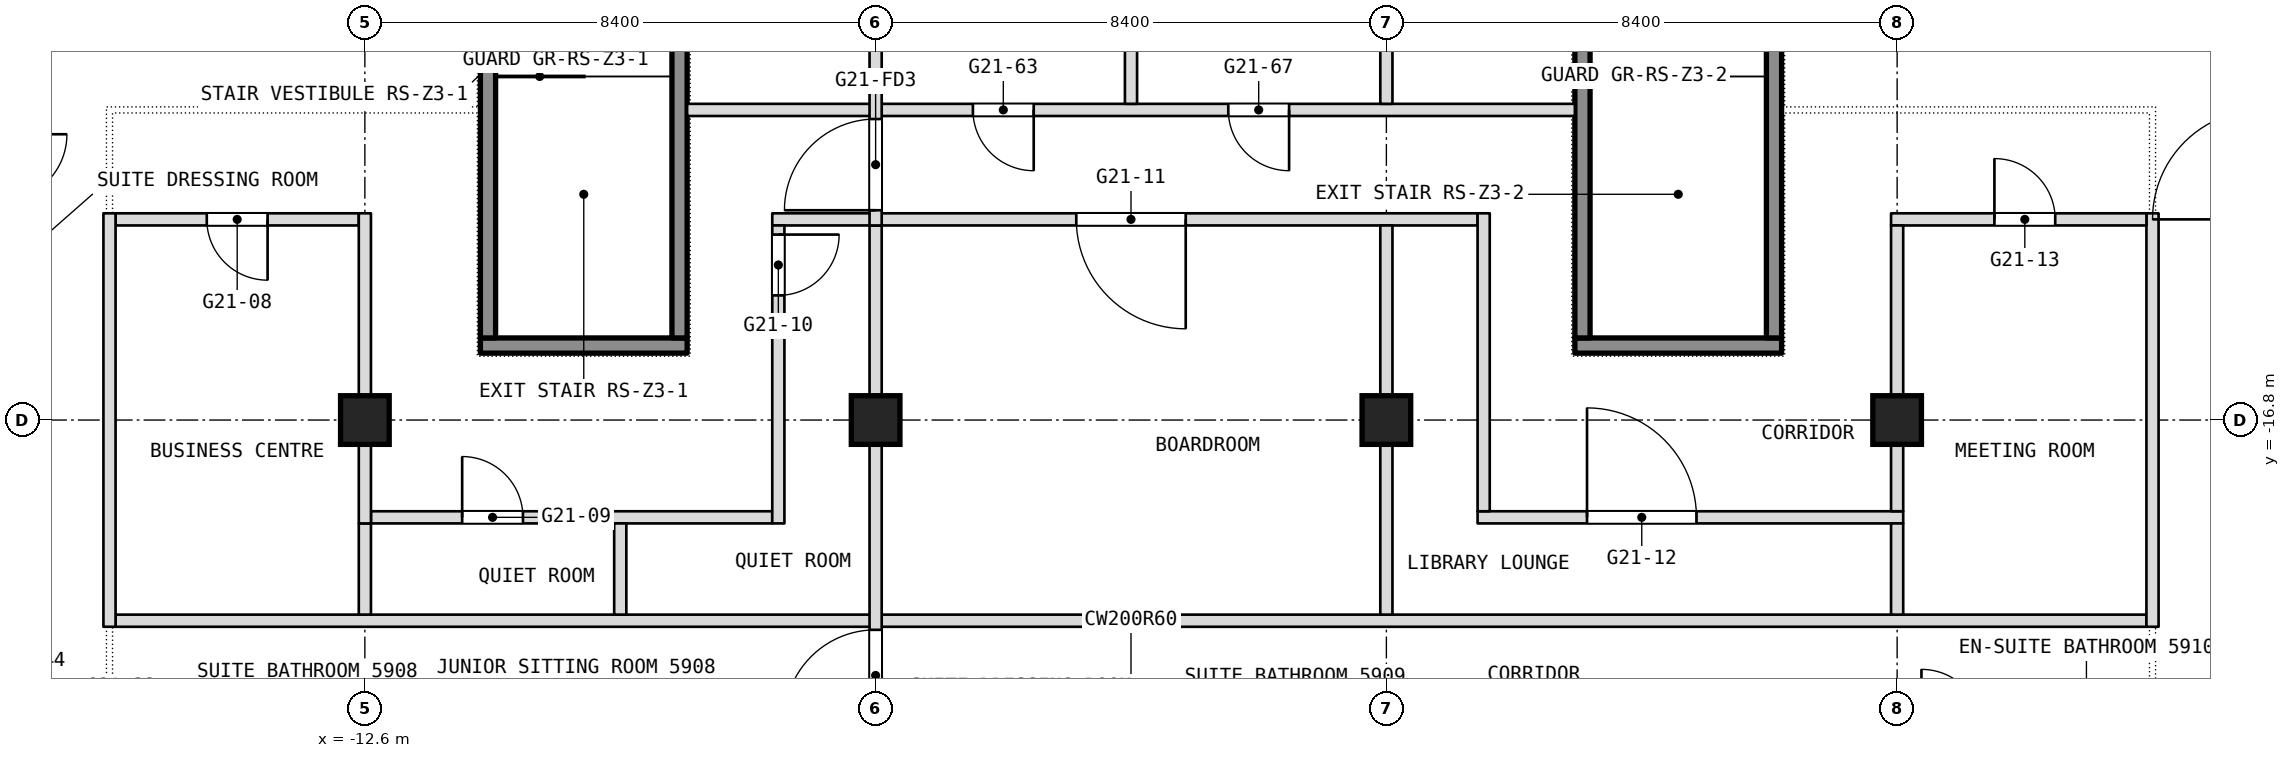
"""IFC4 building model, lengths in metres.
Left out: names, types, materials, properties, quantities, classifications, styles, units other than length and angle.
Written with IfcOpenShell. Run it as: python <this file> out.ifc"""

import sys

from ifc_helpers import new_model, si_unit, direction, frame, frame_2d, origin, origin_2d, place, context, subcontext, project, spatial, rectangle, extrude, element, fill, save


model = new_model("IFC4")
c1 = context("Model", 3, precision=1e-05, world=origin(), true_north=direction((0.0, 1.0)))
c2 = subcontext(c1, "Body", "Model", "MODEL_VIEW")
j1 = project(units=[si_unit("LENGTHUNIT", "METRE"), si_unit("PLANEANGLEUNIT", "RADIAN")], contexts=[c1])
p1 = place(None, origin())
s1 = spatial("IfcSite", under=j1, at=p1, CompositionType="ELEMENT")
p2 = place(p1, origin())
s2 = spatial("IfcBuilding", under=s1, at=p2, CompositionType="ELEMENT")
p3 = place(p2, frame((0.0, 0.0, 248.9)))
s3 = spatial("IfcBuildingStorey", under=s2, at=p3, CompositionType="ELEMENT", Elevation=248.9)
for number, where, z_axis, x_axis in (
    (1, (-12.6, -16.8, 0.0), (0.0, 0.0, 1.0), (1.0, 0.0, 0.0)),
    (2, (-4.2, -16.8, 0.0), (0.0, 0.0, 1.0), (1.0, 0.0, 0.0)),
    (3, (4.2, -16.8, 0.0), (0.0, 0.0, 1.0), (1.0, 0.0, 0.0)),
    (4, (12.6, -16.8, 0.0), (0.0, 0.0, 1.0), (1.0, 0.0, 0.0)),
):
    element("IfcColumn", number, at=place(p3, frame(where, z_axis=z_axis, x_axis=x_axis)), inside=s3, PredefinedType="COLUMN", context=c2, shape_type="SweptSolid", body=[
        extrude(rectangle(XDim=0.8, YDim=0.8, at=origin_2d()), origin(), (0.0, 0.0, 1.0), 3.6),
    ])
p4 = place(p3, frame((-16.7, -20.1, 0.0), z_axis=(0.0, 0.0, 1.0), x_axis=(1.0, 0.0, 0.0)))
e5 = element("IfcWall", 5, at=p4, inside=s3, PredefinedType="PARTITIONING", context=c2, shape_type="SweptSolid", body=[
    extrude(rectangle(XDim=33.4, YDim=0.2, at=frame_2d((16.7, 0.0))), origin(), (0.0, 0.0, 1.0), 3.3),
])
p5 = place(p3, frame((-12.5, -18.4, 0.0), z_axis=(0.0, 0.0, 1.0), x_axis=(1.0, 0.0, 0.0)))
e6 = element("IfcWall", 6, at=p5, inside=s3, PredefinedType="PARTITIONING", context=c2, shape_type="SweptSolid", body=[
    extrude(rectangle(XDim=6.6, YDim=0.2, at=frame_2d((3.3, 0.0))), origin(), (0.0, 0.0, 1.0), 3.3),
])
p6 = place(p5, frame((1.5, 0.0, 0.0)))
e7 = element("IfcOpeningElement", 7, at=p6, cuts=e6, PredefinedType="OPENING", context=c2, shape_type="SweptSolid", body=[
    extrude(rectangle(XDim=1.0, YDim=2.1, at=frame_2d((0.5, 1.05))), frame((0.0, 0.1, 0.0), z_axis=(0.0, -1.0, 0.0), x_axis=(1.0, 0.0, 0.0)), (0.0, 0.0, 1.0), 0.2),
])
p7 = place(p3, frame((5.7, -18.4, 0.0), z_axis=(0.0, 0.0, 1.0), x_axis=(1.0, 0.0, 0.0)))
e8 = element("IfcWall", 8, at=p7, inside=s3, PredefinedType="PARTITIONING", context=c2, shape_type="SweptSolid", body=[
    extrude(rectangle(XDim=7.0, YDim=0.2, at=frame_2d((3.5, 0.0))), origin(), (0.0, 0.0, 1.0), 3.3),
])
p8 = place(p7, frame((1.8, 0.0, 0.0)))
e9 = element("IfcOpeningElement", 9, at=p8, cuts=e8, PredefinedType="OPENING", context=c2, shape_type="SweptSolid", body=[
    extrude(rectangle(XDim=1.8, YDim=2.1, at=frame_2d((0.9, 1.05))), frame((0.0, 0.1, 0.0), z_axis=(0.0, -1.0, 0.0), x_axis=(1.0, 0.0, 0.0)), (0.0, 0.0, 1.0), 0.2),
])
p9 = place(p3, frame((16.8, -20.2, 0.0), z_axis=(0.0, 0.0, 1.0), x_axis=(0.0, 1.0, 0.0)))
e10 = element("IfcWall", 10, at=p9, inside=s3, PredefinedType="PARTITIONING", context=c2, shape_type="SweptSolid", body=[
    extrude(rectangle(XDim=6.8, YDim=0.2, at=frame_2d((3.4, 0.0))), origin(), (0.0, 0.0, 1.0), 3.3),
])
p10 = place(p3, frame((-16.7, -13.5, 0.0), z_axis=(0.0, 0.0, 1.0), x_axis=(1.0, 0.0, 0.0)))
e11 = element("IfcWall", 11, at=p10, inside=s3, PredefinedType="PARTITIONING", context=c2, shape_type="SweptSolid", body=[
    extrude(rectangle(XDim=4.0, YDim=0.2, at=frame_2d((2.0, 0.0))), origin(), (0.0, 0.0, 1.0), 3.3),
])
p11 = place(p10, frame((1.5, 0.0, 0.0)))
e12 = element("IfcOpeningElement", 12, at=p11, cuts=e11, PredefinedType="OPENING", context=c2, shape_type="SweptSolid", body=[
    extrude(rectangle(XDim=1.0, YDim=2.1, at=frame_2d((0.5, 1.05))), frame((0.0, 0.1, 0.0), z_axis=(0.0, -1.0, 0.0), x_axis=(1.0, 0.0, 0.0)), (0.0, 0.0, 1.0), 0.2),
])
p12 = place(p3, frame((-5.9, -13.5, 0.0), z_axis=(0.0, 0.0, 1.0), x_axis=(1.0, 0.0, 0.0)))
e13 = element("IfcWall", 13, at=p12, inside=s3, PredefinedType="PARTITIONING", context=c2, shape_type="SweptSolid", body=[
    extrude(rectangle(XDim=11.6, YDim=0.2, at=frame_2d((5.8, 0.0))), origin(), (0.0, 0.0, 1.0), 3.3),
])
p13 = place(p12, frame((5.0, 0.0, 0.0)))
e14 = element("IfcOpeningElement", 14, at=p13, cuts=e13, PredefinedType="OPENING", context=c2, shape_type="SweptSolid", body=[
    extrude(rectangle(XDim=1.8, YDim=2.1, at=frame_2d((0.9, 1.05))), frame((0.0, 0.1, 0.0), z_axis=(0.0, -1.0, 0.0), x_axis=(1.0, 0.0, 0.0)), (0.0, 0.0, 1.0), 0.2),
])
p14 = place(p3, frame((12.5, -13.5, 0.0), z_axis=(0.0, 0.0, 1.0), x_axis=(1.0, 0.0, 0.0)))
e15 = element("IfcWall", 15, at=p14, inside=s3, PredefinedType="PARTITIONING", context=c2, shape_type="SweptSolid", body=[
    extrude(rectangle(XDim=4.2, YDim=0.2, at=frame_2d((2.1, 0.0))), origin(), (0.0, 0.0, 1.0), 3.3),
])
p15 = place(p14, frame((1.7, 0.0, 0.0)))
e16 = element("IfcOpeningElement", 16, at=p15, cuts=e15, PredefinedType="OPENING", context=c2, shape_type="SweptSolid", body=[
    extrude(rectangle(XDim=1.0, YDim=2.1, at=frame_2d((0.5, 1.05))), frame((0.0, 0.1, 0.0), z_axis=(0.0, -1.0, 0.0), x_axis=(1.0, 0.0, 0.0)), (0.0, 0.0, 1.0), 0.2),
])
p16 = place(p3, frame((12.6, -20.0, 0.0), z_axis=(0.0, 0.0, 1.0), x_axis=(0.0, 1.0, 0.0)))
e17 = element("IfcWall", 17, at=p16, inside=s3, PredefinedType="PARTITIONING", context=c2, shape_type="SweptSolid", body=[
    extrude(rectangle(XDim=1.5, YDim=0.2, at=frame_2d((0.75, 0.0))), origin(), (0.0, 0.0, 1.0), 2.486),
])
p17 = place(p3, frame((12.6, -18.3, 0.0), z_axis=(0.0, 0.0, 1.0), x_axis=(0.0, 1.0, 0.0)))
e18 = element("IfcWall", 18, at=p17, inside=s3, PredefinedType="PARTITIONING", context=c2, shape_type="SweptSolid", body=[
    extrude(rectangle(XDim=4.7, YDim=0.2, at=frame_2d((2.35, 0.0))), origin(), (0.0, 0.0, 1.0), 2.486),
])
p18 = place(p3, frame((-7.3, -11.7, 0.0), z_axis=(0.0, 0.0, 1.0), x_axis=(1.0, 0.0, 0.0)))
e19 = element("IfcWall", 19, at=p18, inside=s3, PredefinedType="PARTITIONING", context=c2, shape_type="SweptSolid", body=[
    extrude(rectangle(XDim=14.6, YDim=0.2, at=frame_2d((7.3, 0.0))), origin(), (0.0, 0.0, 1.0), 3.3),
])
p19 = place(p18, frame((4.7, 0.0, 0.0)))
e20 = element("IfcOpeningElement", 20, at=p19, cuts=e19, PredefinedType="OPENING", context=c2, shape_type="SweptSolid", body=[
    extrude(rectangle(XDim=1.0, YDim=2.1, at=frame_2d((0.5, 1.05))), frame((0.0, 0.1, 0.0), z_axis=(0.0, -1.0, 0.0), x_axis=(1.0, 0.0, 0.0)), (0.0, 0.0, 1.0), 0.2),
])
p20 = place(p18, frame((8.9, 0.0, 0.0)))
e21 = element("IfcOpeningElement", 21, at=p20, cuts=e19, PredefinedType="OPENING", context=c2, shape_type="SweptSolid", body=[
    extrude(rectangle(XDim=1.0, YDim=2.1, at=frame_2d((0.5, 1.05))), frame((0.0, 0.1, 0.0), z_axis=(0.0, -1.0, 0.0), x_axis=(1.0, 0.0, 0.0)), (0.0, 0.0, 1.0), 0.2),
])
p21 = place(p3, frame((5.8, -18.3, 0.0), z_axis=(0.0, 0.0, 1.0), x_axis=(0.0, 1.0, 0.0)))
e22 = element("IfcWall", 22, at=p21, inside=s3, PredefinedType="PARTITIONING", context=c2, shape_type="SweptSolid", body=[
    extrude(rectangle(XDim=4.9, YDim=0.2, at=frame_2d((2.45, 0.0))), origin(), (0.0, 0.0, 1.0), 3.3),
])
p22 = place(p3, frame((4.2, -20.0, 0.0), z_axis=(0.0, 0.0, 1.0), x_axis=(0.0, 1.0, 0.0)))
e23 = element("IfcWall", 23, at=p22, inside=s3, PredefinedType="PARTITIONING", context=c2, shape_type="SweptSolid", body=[
    extrude(rectangle(XDim=6.4, YDim=0.2, at=frame_2d((3.2, 0.0))), origin(), (0.0, 0.0, 1.0), 2.486),
])
p23 = place(p3, frame((4.2, -11.6, 0.0), z_axis=(0.0, 0.0, 1.0), x_axis=(0.0, 1.0, 0.0)))
e24 = element("IfcWall", 24, at=p23, inside=s3, PredefinedType="PARTITIONING", context=c2, shape_type="SweptSolid", body=[
    extrude(rectangle(XDim=9.7, YDim=0.2, at=frame_2d((4.85, 0.0))), origin(), (0.0, 0.0, 1.0), 2.486),
])
p24 = place(p3, frame((0.0, -11.6, 0.0), z_axis=(0.0, 0.0, 1.0), x_axis=(0.0, 1.0, 0.0)))
e25 = element("IfcWall", 25, at=p24, inside=s3, PredefinedType="PARTITIONING", context=c2, shape_type="SweptSolid", body=[
    extrude(rectangle(XDim=9.7, YDim=0.2, at=frame_2d((4.85, 0.0))), origin(), (0.0, 0.0, 1.0), 3.3),
])
p25 = place(p3, frame((-4.2, -22.0, 0.0), z_axis=(0.0, 0.0, 1.0), x_axis=(0.0, 1.0, 0.0)))
e26 = element("IfcWall", 26, at=p25, inside=s3, PredefinedType="PARTITIONING", context=c2, shape_type="SweptSolid", body=[
    extrude(rectangle(XDim=8.4, YDim=0.2, at=frame_2d((4.2, 0.0))), origin(), (0.0, 0.0, 1.0), 2.486),
])
p26 = place(p25, frame((0.25, 0.0, 0.0)))
e27 = element("IfcOpeningElement", 27, at=p26, cuts=e26, PredefinedType="OPENING", context=c2, shape_type="SweptSolid", body=[
    extrude(rectangle(XDim=1.5, YDim=2.1, at=frame_2d((0.75, 1.05))), frame((0.0, 0.1, 0.0), z_axis=(0.0, -1.0, 0.0), x_axis=(1.0, 0.0, 0.0)), (0.0, 0.0, 1.0), 0.2),
])
p27 = place(p3, frame((-4.2, -13.6, 0.0), z_axis=(0.0, 0.0, 1.0), x_axis=(0.0, 1.0, 0.0)))
e28 = element("IfcWall", 28, at=p27, inside=s3, PredefinedType="PARTITIONING", context=c2, shape_type="SweptSolid", body=[
    extrude(rectangle(XDim=13.6, YDim=0.2, at=frame_2d((6.8, 0.0))), origin(), (0.0, 0.0, 1.0), 2.486),
])
p28 = place(p27, frame((11.95, 0.0, 0.0)))
e29 = element("IfcOpeningElement", 29, at=p28, cuts=e28, PredefinedType="OPENING", context=c2, shape_type="SweptSolid", body=[
    extrude(rectangle(XDim=1.5, YDim=2.1, at=frame_2d((0.75, 1.05))), frame((0.0, 0.1, 0.0), z_axis=(0.0, -1.0, 0.0), x_axis=(1.0, 0.0, 0.0)), (0.0, 0.0, 1.0), 0.2),
])
p29 = place(p27, frame((0.25, 0.0, 0.0)))
e30 = element("IfcOpeningElement", 30, at=p29, cuts=e28, PredefinedType="OPENING", context=c2, shape_type="SweptSolid", body=[
    extrude(rectangle(XDim=1.5, YDim=2.1, at=frame_2d((0.75, 1.05))), frame((0.0, 0.1, 0.0), z_axis=(0.0, -1.0, 0.0), x_axis=(1.0, 0.0, 0.0)), (0.0, 0.0, 1.0), 0.2),
])
p30 = place(p3, frame((-5.8, -18.5, 0.0), z_axis=(0.0, 0.0, 1.0), x_axis=(0.0, 1.0, 0.0)))
e31 = element("IfcWall", 31, at=p30, inside=s3, PredefinedType="PARTITIONING", context=c2, shape_type="SweptSolid", body=[
    extrude(rectangle(XDim=4.9, YDim=0.2, at=frame_2d((2.45, 0.0))), origin(), (0.0, 0.0, 1.0), 3.3),
])
p31 = place(p30, frame((3.75, 0.0, 0.0)))
e32 = element("IfcOpeningElement", 32, at=p31, cuts=e31, PredefinedType="OPENING", context=c2, shape_type="SweptSolid", body=[
    extrude(rectangle(XDim=1.0, YDim=2.1, at=frame_2d((0.5, 1.05))), frame((0.0, 0.1, 0.0), z_axis=(0.0, -1.0, 0.0), x_axis=(1.0, 0.0, 0.0)), (0.0, 0.0, 1.0), 0.2),
])
p32 = place(p3, frame((-8.4, -20.0, 0.0), z_axis=(0.0, 0.0, 1.0), x_axis=(0.0, 1.0, 0.0)))
e33 = element("IfcWall", 33, at=p32, inside=s3, PredefinedType="PARTITIONING", context=c2, shape_type="SweptSolid", body=[
    extrude(rectangle(XDim=1.5, YDim=0.2, at=frame_2d((0.75, 0.0))), origin(), (0.0, 0.0, 1.0), 3.3),
])
p33 = place(p3, frame((-12.6, -20.0, 0.0), z_axis=(0.0, 0.0, 1.0), x_axis=(0.0, 1.0, 0.0)))
e34 = element("IfcWall", 34, at=p33, inside=s3, PredefinedType="PARTITIONING", context=c2, shape_type="SweptSolid", body=[
    extrude(rectangle(XDim=1.5, YDim=0.2, at=frame_2d((0.75, 0.0))), origin(), (0.0, 0.0, 1.0), 2.486),
])
p34 = place(p3, frame((-12.6, -18.5, 0.0), z_axis=(0.0, 0.0, 1.0), x_axis=(0.0, 1.0, 0.0)))
e35 = element("IfcWall", 35, at=p34, inside=s3, PredefinedType="PARTITIONING", context=c2, shape_type="SweptSolid", body=[
    extrude(rectangle(XDim=5.1, YDim=0.2, at=frame_2d((2.55, 0.0))), origin(), (0.0, 0.0, 1.0), 2.486),
])
p35 = place(p3, frame((-16.8, -20.2, 0.0), z_axis=(0.0, 0.0, 1.0), x_axis=(0.0, 1.0, 0.0)))
e36 = element("IfcWall", 36, at=p35, inside=s3, PredefinedType="PARTITIONING", context=c2, shape_type="SweptSolid", body=[
    extrude(rectangle(XDim=6.8, YDim=0.2, at=frame_2d((3.4, 0.0))), origin(), (0.0, 0.0, 1.0), 3.3),
])
p36 = place(p3, frame((-10.7, -15.575, 0.1), z_axis=(0.0, 0.0, 1.0), x_axis=(1.0, 0.0, 0.0)))
e37 = element("IfcWall", 37, at=p36, inside=s3, PredefinedType="SHEAR", context=c2, shape_type="SweptSolid", body=[
    extrude(rectangle(XDim=3.4, YDim=0.25, at=frame_2d((1.7, 0.0))), origin(), (0.0, 0.0, 1.0), 3.2),
])
for number, where, z_axis, x_axis in (
    (38, (-10.575, -15.45, 0.1), (0.0, 0.0, 1.0), (0.0, 1.0, 0.0)),
    (39, (-7.425, -15.45, 0.1), (0.0, 0.0, 1.0), (0.0, 1.0, 0.0)),
):
    element("IfcWall", number, at=place(p3, frame(where, z_axis=z_axis, x_axis=x_axis)), inside=s3, PredefinedType="SHEAR", context=c2, shape_type="SweptSolid", body=[
        extrude(rectangle(XDim=5.7, YDim=0.25, at=frame_2d((2.85, 0.0))), origin(), (0.0, 0.0, 1.0), 3.2),
    ])
p37 = place(p3, frame((7.3, -15.575, 0.1), z_axis=(0.0, 0.0, 1.0), x_axis=(1.0, 0.0, 0.0)))
e40 = element("IfcWall", 40, at=p37, inside=s3, PredefinedType="SHEAR", context=c2, shape_type="SweptSolid", body=[
    extrude(rectangle(XDim=3.4, YDim=0.25, at=frame_2d((1.7, 0.0))), origin(), (0.0, 0.0, 1.0), 3.2),
])
for number, where, z_axis, x_axis in (
    (41, (7.425, -15.45, 0.1), (0.0, 0.0, 1.0), (0.0, 1.0, 0.0)),
    (42, (10.575, -15.45, 0.1), (0.0, 0.0, 1.0), (0.0, 1.0, 0.0)),
):
    element("IfcWall", number, at=place(p3, frame(where, z_axis=z_axis, x_axis=x_axis)), inside=s3, PredefinedType="SHEAR", context=c2, shape_type="SweptSolid", body=[
        extrude(rectangle(XDim=5.7, YDim=0.25, at=frame_2d((2.85, 0.0))), origin(), (0.0, 0.0, 1.0), 3.2),
    ])
p38 = place(p6, origin())
e43 = element("IfcDoor", 43, at=p38, inside=s3, OperationType="SINGLE_SWING_RIGHT", PredefinedType="DOOR", context=c2, shape_type="SweptSolid", body=[
    extrude(rectangle(XDim=1.0, YDim=2.1, at=frame_2d((0.5, 1.05))), frame((0.0, 0.025, 0.0), z_axis=(0.0, -1.0, 0.0), x_axis=(1.0, 0.0, 0.0)), (0.0, 0.0, 1.0), 0.05),
])
fill(e7, e43)
p39 = place(p8, origin())
e44 = element("IfcDoor", 44, at=p39, inside=s3, OperationType="DOUBLE_DOOR_SINGLE_SWING", PredefinedType="DOOR", context=c2, shape_type="SweptSolid", body=[
    extrude(rectangle(XDim=1.8, YDim=2.1, at=frame_2d((0.9, 1.05))), frame((0.0, 0.025, 0.0), z_axis=(0.0, -1.0, 0.0), x_axis=(1.0, 0.0, 0.0)), (0.0, 0.0, 1.0), 0.05),
])
fill(e9, e44)
p40 = place(p11, origin())
e45 = element("IfcDoor", 45, at=p40, inside=s3, OperationType="SINGLE_SWING_RIGHT", PredefinedType="DOOR", context=c2, shape_type="SweptSolid", body=[
    extrude(rectangle(XDim=1.0, YDim=2.1, at=frame_2d((0.5, 1.05))), frame((0.0, 0.025, 0.0), z_axis=(0.0, -1.0, 0.0), x_axis=(1.0, 0.0, 0.0)), (0.0, 0.0, 1.0), 0.05),
])
fill(e12, e45)
p41 = place(p13, origin())
e46 = element("IfcDoor", 46, at=p41, inside=s3, OperationType="DOUBLE_DOOR_SINGLE_SWING", PredefinedType="DOOR", context=c2, shape_type="SweptSolid", body=[
    extrude(rectangle(XDim=1.8, YDim=2.1, at=frame_2d((0.9, 1.05))), frame((0.0, 0.025, 0.0), z_axis=(0.0, -1.0, 0.0), x_axis=(1.0, 0.0, 0.0)), (0.0, 0.0, 1.0), 0.05),
])
fill(e14, e46)
p42 = place(p15, origin())
e47 = element("IfcDoor", 47, at=p42, inside=s3, OperationType="SINGLE_SWING_LEFT", PredefinedType="DOOR", context=c2, shape_type="SweptSolid", body=[
    extrude(rectangle(XDim=1.0, YDim=2.1, at=frame_2d((0.5, 1.05))), frame((0.0, 0.025, 0.0), z_axis=(0.0, -1.0, 0.0), x_axis=(1.0, 0.0, 0.0)), (0.0, 0.0, 1.0), 0.05),
])
fill(e16, e47)
p43 = place(p19, origin())
e48 = element("IfcDoor", 48, at=p43, inside=s3, OperationType="SINGLE_SWING_LEFT", PredefinedType="DOOR", context=c2, shape_type="SweptSolid", body=[
    extrude(rectangle(XDim=1.0, YDim=2.1, at=frame_2d((0.5, 1.05))), frame((0.0, 0.025, 0.0), z_axis=(0.0, -1.0, 0.0), x_axis=(1.0, 0.0, 0.0)), (0.0, 0.0, 1.0), 0.05),
])
fill(e20, e48)
p44 = place(p20, origin())
e49 = element("IfcDoor", 49, at=p44, inside=s3, OperationType="SINGLE_SWING_LEFT", PredefinedType="DOOR", context=c2, shape_type="SweptSolid", body=[
    extrude(rectangle(XDim=1.0, YDim=2.1, at=frame_2d((0.5, 1.05))), frame((0.0, 0.025, 0.0), z_axis=(0.0, -1.0, 0.0), x_axis=(1.0, 0.0, 0.0)), (0.0, 0.0, 1.0), 0.05),
])
fill(e21, e49)
p45 = place(p31, origin())
e50 = element("IfcDoor", 50, at=p45, inside=s3, OperationType="SINGLE_SWING_RIGHT", PredefinedType="DOOR", context=c2, shape_type="SweptSolid", body=[
    extrude(rectangle(XDim=1.0, YDim=2.1, at=frame_2d((0.5, 1.05))), frame((0.0, 0.025, 0.0), z_axis=(0.0, -1.0, 0.0), x_axis=(1.0, 0.0, 0.0)), (0.0, 0.0, 1.0), 0.05),
])
fill(e32, e50)
p46 = place(p29, origin())
e51 = element("IfcDoor", 51, at=p46, inside=s3, OperationType="DOUBLE_DOOR_DOUBLE_SWING", PredefinedType="DOOR", context=c2, shape_type="SweptSolid", body=[
    extrude(rectangle(XDim=1.5, YDim=2.1, at=frame_2d((0.75, 1.05))), frame((0.0, 0.025, 0.0), z_axis=(0.0, -1.0, 0.0), x_axis=(1.0, 0.0, 0.0)), (0.0, 0.0, 1.0), 0.05),
])
fill(e30, e51)
p47 = place(p26, origin())
e52 = element("IfcDoor", 52, at=p47, inside=s3, OperationType="DOUBLE_DOOR_DOUBLE_SWING", PredefinedType="DOOR", context=c2, shape_type="SweptSolid", body=[
    extrude(rectangle(XDim=1.5, YDim=2.1, at=frame_2d((0.75, 1.05))), frame((0.0, 0.025, 0.0), z_axis=(0.0, -1.0, 0.0), x_axis=(1.0, 0.0, 0.0)), (0.0, 0.0, 1.0), 0.05),
])
fill(e27, e52)
save(model, sys.argv[1])
